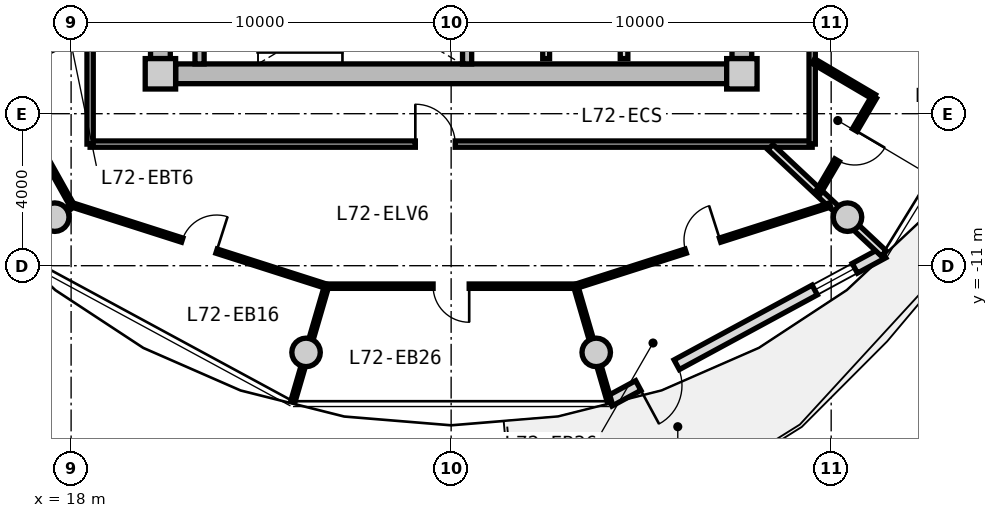
"""IFC4 building model, lengths in metres.
Left out: names, types, materials, properties, quantities, classifications, styles, units other than length and angle.
Written with IfcOpenShell. Run it as: python <this file> out.ifc"""

import sys

from ifc_helpers import new_model, si_unit, direction, frame, frame_2d, origin, origin_2d, place, context, subcontext, project, spatial, rectangle, circle, extrude, source, transform, mapped, element, fill, save


model = new_model("IFC4")
c1 = context("Model", 3, precision=1e-05, world=origin(), true_north=direction((0.0, 1.0)))
c2 = subcontext(c1, "Body", "Model", "MODEL_VIEW")
j1 = project(units=[si_unit("LENGTHUNIT", "METRE"), si_unit("PLANEANGLEUNIT", "RADIAN")], contexts=[c1])
p1 = place(None, origin())
s1 = spatial("IfcSite", under=j1, at=p1, CompositionType="ELEMENT")
p2 = place(p1, origin())
s2 = spatial("IfcBuilding", under=s1, at=p2, CompositionType="ELEMENT")
p3 = place(p2, frame((0.0, 0.0, 232.2)))
s3 = spatial("IfcBuildingStorey", under=s2, at=p3, CompositionType="ELEMENT", Elevation=232.2)
m1 = source(origin(), c2, "Body", "SweptSolid", [
    extrude(rectangle(XDim=0.8, YDim=0.8, at=origin_2d()), origin(), (0.0, 0.0, 1.0), 3.05),
])
for number, where, z_axis, x_axis in (
    (1, (20.35, -5.95, 0.0), (0.0, 0.0, 1.0), (1.0, 0.0, 0.0)),
    (2, (35.65, -5.95, 0.0), (0.0, 0.0, 1.0), (1.0, 0.0, 0.0)),
):
    element("IfcColumn", number, at=place(p3, frame(where, z_axis=z_axis, x_axis=x_axis)), inside=s3, PredefinedType="COLUMN", context=c2, shape_type="MappedRepresentation", body=[
        mapped(m1, transform((0.0, 0.0, 0.0), x_axis=(1.0, 0.0, 0.0), y_axis=(0.0, 1.0, 0.0), z_axis=(0.0, 0.0, 1.0), scale=1.0)),
    ])
m2 = source(origin(), c2, "Body", "SweptSolid", [
    extrude(rectangle(XDim=14.5, YDim=0.52, at=frame_2d((7.25, 0.0))), origin(), (0.0, 0.0, 1.0), 2.81),
])
p4 = place(p3, frame((35.25, -5.95, 0.0), z_axis=(0.0, 0.0, 1.0), x_axis=(-1.0, 0.0, 0.0)))
e3 = element("IfcWall", 3, at=p4, inside=s3, PredefinedType="SHEAR", context=c2, shape_type="MappedRepresentation", body=[
    mapped(m2, transform((0.0, 0.0, 0.0), x_axis=(1.0, 0.0, 0.0), y_axis=(0.0, 1.0, 0.0), z_axis=(0.0, 0.0, 1.0), scale=1.0)),
])
m3 = source(origin(), c2, "Body", "SweptSolid", [
    extrude(rectangle(XDim=11.1, YDim=0.52, at=frame_2d((5.55, 0.0))), origin(), (0.0, 0.0, 1.0), 2.81),
])
p5 = place(p3, frame((20.35, -5.55, 0.0), z_axis=(0.0, 0.0, 1.0), x_axis=(0.0, 1.0, 0.0)))
e4 = element("IfcWall", 4, at=p5, inside=s3, PredefinedType="SHEAR", context=c2, shape_type="MappedRepresentation", body=[
    mapped(m3, transform((0.0, 0.0, 0.0), x_axis=(1.0, 0.0, 0.0), y_axis=(0.0, 1.0, 0.0), z_axis=(0.0, 0.0, 1.0), scale=1.0)),
])
p6 = place(p5, frame((3.8, 0.0, 0.0)))
e5 = element("IfcOpeningElement", 5, at=p6, cuts=e4, PredefinedType="OPENING", context=c2, shape_type="SweptSolid", body=[
    extrude(rectangle(XDim=1.2, YDim=2.15, at=frame_2d((0.6, 1.075))), frame((0.0, 0.27, 0.0), z_axis=(0.0, -1.0, 0.0), x_axis=(1.0, 0.0, 0.0)), (0.0, 0.0, 1.0), 0.54),
])
p7 = place(p3, frame((35.65, 5.55, 0.0), z_axis=(0.0, 0.0, 1.0), x_axis=(0.0, -1.0, 0.0)))
e6 = element("IfcWall", 6, at=p7, inside=s3, PredefinedType="SHEAR", context=c2, shape_type="MappedRepresentation", body=[
    mapped(m3, transform((0.0, 0.0, 0.0), x_axis=(1.0, 0.0, 0.0), y_axis=(0.0, 1.0, 0.0), z_axis=(0.0, 0.0, 1.0), scale=1.0)),
])
p8 = place(p7, frame((5.65, 0.0, 0.0)))
e7 = element("IfcOpeningElement", 7, at=p8, cuts=e6, PredefinedType="OPENING", context=c2, shape_type="SweptSolid", body=[
    extrude(rectangle(XDim=1.2, YDim=2.15, at=frame_2d((0.6, 1.075))), frame((0.0, 0.27, 0.0), z_axis=(0.0, -1.0, 0.0), x_axis=(1.0, 0.0, 0.0)), (0.0, 0.0, 1.0), 0.54),
])
m4 = source(origin(), c2, "Body", "SweptSolid", [
    extrude(circle(Radius=0.375, at=origin_2d()), origin(), (0.0, 0.0, 1.0), 3.05),
])
for number, where, z_axis, x_axis in (
    (8, (17.57, -9.723, 0.0), (0.0, 0.0, 1.0), (1.0, 0.0, 0.0)),
    (9, (24.182, -13.281, 0.0), (0.0, 0.0, 1.0), (1.0, 0.0, 0.0)),
    (10, (31.818, -13.281, 0.0), (0.0, 0.0, 1.0), (1.0, 0.0, 0.0)),
    (11, (38.43, -9.723, 0.0), (0.0, 0.0, 1.0), (1.0, 0.0, 0.0)),
):
    element("IfcColumn", number, at=place(p3, frame(where, z_axis=z_axis, x_axis=x_axis)), inside=s3, PredefinedType="COLUMN", context=c2, shape_type="MappedRepresentation", body=[
        mapped(m4, transform((0.0, 0.0, 0.0), x_axis=(1.0, 0.0, 0.0), y_axis=(0.0, 1.0, 0.0), z_axis=(0.0, 0.0, 1.0), scale=1.0)),
    ])
m5 = source(origin(), c2, "Body", "SweptSolid", [
    extrude(rectangle(XDim=8.197, YDim=0.29, at=frame_2d((4.099, 0.0))), origin(), (0.0, 0.0, 1.0), 2.81),
])
p9 = place(p3, frame((39.37, -10.663, 0.0), z_axis=(0.0, 0.0, 1.0), x_axis=(-0.879369910001, -0.476139224791, 0.0)))
e12 = element("IfcWall", 12, at=p9, inside=s3, PredefinedType="SOLIDWALL", context=c2, shape_type="MappedRepresentation", body=[
    mapped(m5, transform((0.0, 0.0, 0.0), x_axis=(1.0, 0.0, 0.0), y_axis=(0.0, 1.0, 0.0), z_axis=(0.0, 0.0, 1.0), scale=1.0)),
])
p10 = place(p9, frame((6.18, 0.0, 0.0)))
e13 = element("IfcOpeningElement", 13, at=p10, cuts=e12, PredefinedType="OPENING", context=c2, shape_type="SweptSolid", body=[
    extrude(rectangle(XDim=1.15, YDim=2.25, at=frame_2d((0.575, 1.125))), frame((0.0, 0.155, 0.0), z_axis=(0.0, -1.0, 0.0), x_axis=(1.0, 0.0, 0.0)), (0.0, 0.0, 1.0), 0.31),
])
p11 = place(p9, frame((0.85, 0.0, 0.85)))
e14 = element("IfcOpeningElement", 14, at=p11, cuts=e12, PredefinedType="OPENING", context=c2, shape_type="SweptSolid", body=[
    extrude(rectangle(XDim=1.2, YDim=1.5, at=frame_2d((0.6, 0.75))), frame((0.0, 0.155, 0.0), z_axis=(0.0, -1.0, 0.0), x_axis=(1.0, 0.0, 0.0)), (0.0, 0.0, 1.0), 0.31),
])
m6 = source(origin(), c2, "Body", "SweptSolid", [
    extrude(rectangle(XDim=3.24, YDim=0.24, at=frame_2d((1.62, 0.0))), origin(), (0.0, 0.0, 1.0), 2.81),
])
for number, where, z_axis, x_axis in (
    (15, (21.38, -5.69, 0.0), (0.0, 0.0, 1.0), (0.0, 1.0, 0.0)),
    (16, (28.42, -5.69, 0.0), (0.0, 0.0, 1.0), (0.0, 1.0, 0.0)),
):
    element("IfcWall", number, at=place(p3, frame(where, z_axis=z_axis, x_axis=x_axis)), inside=s3, PredefinedType="PARTITIONING", context=c2, shape_type="MappedRepresentation", body=[
        mapped(m6, transform((0.0, 0.0, 0.0), x_axis=(1.0, 0.0, 0.0), y_axis=(0.0, 1.0, 0.0), z_axis=(0.0, 0.0, 1.0), scale=1.0)),
    ])
m7 = source(origin(), c2, "Body", "SweptSolid", [
    extrude(rectangle(XDim=3.8, YDim=0.2, at=frame_2d((1.9, 0.0))), origin(), (0.0, 0.0, 1.0), 2.795),
])
p12 = place(p3, frame((32.55, -5.55, 0.0), z_axis=(0.0, 0.0, 1.0), x_axis=(0.0, 1.0, 0.0)))
e17 = element("IfcWall", 17, at=p12, inside=s3, PredefinedType="PARTITIONING", context=c2, shape_type="MappedRepresentation", body=[
    mapped(m7, transform((0.0, 0.0, 0.0), x_axis=(1.0, 0.0, 0.0), y_axis=(0.0, 1.0, 0.0), z_axis=(0.0, 0.0, 1.0), scale=1.0)),
])
m8 = source(origin(), c2, "Body", "SweptSolid", [
    extrude(rectangle(XDim=4.2, YDim=0.18, at=frame_2d((2.1, 0.0))), origin(), (0.0, 0.0, 1.0), 2.795),
])
p13 = place(p3, frame((30.5, -5.55, 0.0), z_axis=(0.0, 0.0, 1.0), x_axis=(0.0, 1.0, 0.0)))
e18 = element("IfcWall", 18, at=p13, inside=s3, PredefinedType="PARTITIONING", context=c2, shape_type="MappedRepresentation", body=[
    mapped(m8, transform((0.0, 0.0, 0.0), x_axis=(1.0, 0.0, 0.0), y_axis=(0.0, 1.0, 0.0), z_axis=(0.0, 0.0, 1.0), scale=1.0)),
])
m9 = source(origin(), c2, "Body", "SweptSolid", [
    extrude(rectangle(XDim=19.0, YDim=0.165, at=frame_2d((9.5, 0.0))), origin(), (0.0, 0.0, 1.0), 2.795),
])
p14 = place(p3, frame((37.5, -7.8, 0.0), z_axis=(0.0, 0.0, 1.0), x_axis=(-1.0, 0.0, 0.0)))
e19 = element("IfcWall", 19, at=p14, inside=s3, PredefinedType="PARTITIONING", context=c2, shape_type="MappedRepresentation", body=[
    mapped(m9, transform((0.0, 0.0, 0.0), x_axis=(1.0, 0.0, 0.0), y_axis=(0.0, 1.0, 0.0), z_axis=(0.0, 0.0, 1.0), scale=1.0)),
])
p15 = place(p14, frame((9.392, 0.0, 0.0)))
e20 = element("IfcOpeningElement", 20, at=p15, cuts=e19, PredefinedType="OPENING", context=c2, shape_type="SweptSolid", body=[
    extrude(rectangle(XDim=1.05, YDim=2.15, at=frame_2d((0.525, 1.075))), frame((0.0, 0.093, 0.0), z_axis=(0.0, -1.0, 0.0), x_axis=(1.0, 0.0, 0.0)), (0.0, 0.0, 1.0), 0.185),
])
m10 = source(origin(), c2, "Body", "SweptSolid", [
    extrude(rectangle(XDim=6.88, YDim=0.165, at=frame_2d((3.44, 0.0))), origin(), (0.0, 0.0, 1.0), 2.795),
])
p16 = place(p3, frame((18.5, -7.8, 0.0), z_axis=(0.0, 0.0, 1.0), x_axis=(0.0, 1.0, 0.0)))
e21 = element("IfcWall", 21, at=p16, inside=s3, PredefinedType="PARTITIONING", context=c2, shape_type="MappedRepresentation", body=[
    mapped(m10, transform((0.0, 0.0, 0.0), x_axis=(1.0, 0.0, 0.0), y_axis=(0.0, 1.0, 0.0), z_axis=(0.0, 0.0, 1.0), scale=1.0)),
])
p17 = place(p3, frame((37.5, -0.92, 0.0), z_axis=(0.0, 0.0, 1.0), x_axis=(0.0, -1.0, 0.0)))
e22 = element("IfcWall", 22, at=p17, inside=s3, PredefinedType="PARTITIONING", context=c2, shape_type="MappedRepresentation", body=[
    mapped(m10, transform((0.0, 0.0, 0.0), x_axis=(1.0, 0.0, 0.0), y_axis=(0.0, 1.0, 0.0), z_axis=(0.0, 0.0, 1.0), scale=1.0)),
])
p18 = place(p17, frame((2.586, 0.0, 0.0)))
e23 = element("IfcOpeningElement", 23, at=p18, cuts=e22, PredefinedType="OPENING", context=c2, shape_type="SweptSolid", body=[
    extrude(rectangle(XDim=1.05, YDim=2.15, at=frame_2d((0.525, 1.075))), frame((0.0, 0.093, 0.0), z_axis=(0.0, -1.0, 0.0), x_axis=(1.0, 0.0, 0.0)), (0.0, 0.0, 1.0), 0.185),
])
m11 = source(origin(), c2, "Body", "SweptSolid", [
    extrude(rectangle(XDim=4.089, YDim=0.19, at=frame_2d((2.044, 0.0))), origin(), (0.0, 0.0, 1.0), 2.395),
])
p19 = place(p3, frame((36.402, -7.88, 0.0), z_axis=(0.0, 0.0, 1.0), x_axis=(0.729401273609, -0.684086092577, 0.0)))
e24 = element("IfcWall", 24, at=p19, inside=s3, PredefinedType="PARTITIONING", context=c2, shape_type="MappedRepresentation", body=[
    mapped(m11, transform((0.0, 0.0, 0.0), x_axis=(1.0, 0.0, 0.0), y_axis=(0.0, 1.0, 0.0), z_axis=(0.0, 0.0, 1.0), scale=1.0)),
])
m12 = source(origin(), c2, "Body", "SweptSolid", [
    extrude(rectangle(XDim=7.024, YDim=0.115, at=frame_2d((3.512, 0.0))), origin(), (0.0, 0.0, 1.0), 2.795),
])
p20 = place(p3, frame((18.03, -9.401, 0.0), z_axis=(0.0, 0.0, 1.0), x_axis=(0.952454006655, -0.304682400552, 0.0)))
e25 = element("IfcWall", 25, at=p20, inside=s3, PredefinedType="PARTITIONING", context=c2, shape_type="MappedRepresentation", body=[
    mapped(m12, transform((0.0, 0.0, 0.0), x_axis=(1.0, 0.0, 0.0), y_axis=(0.0, 1.0, 0.0), z_axis=(0.0, 0.0, 1.0), scale=1.0)),
])
p21 = place(p20, frame((3.037, 0.0, 0.0)))
e26 = element("IfcOpeningElement", 26, at=p21, cuts=e25, PredefinedType="OPENING", context=c2, shape_type="SweptSolid", body=[
    extrude(rectangle(XDim=0.95, YDim=2.1, at=frame_2d((0.475, 1.05))), frame((0.0, 0.067, 0.0), z_axis=(0.0, -1.0, 0.0), x_axis=(1.0, 0.0, 0.0)), (0.0, 0.0, 1.0), 0.135),
])
m13 = source(origin(), c2, "Body", "SweptSolid", [
    extrude(rectangle(XDim=1.905, YDim=0.115, at=frame_2d((0.953, 0.0))), origin(), (0.0, 0.0, 1.0), 2.395),
])
p22 = place(p3, frame((18.03, -9.401, 0.0), z_axis=(0.0, 0.0, 1.0), x_axis=(-0.742624708137, -0.669707804094, 0.0)))
e27 = element("IfcWall", 27, at=p22, inside=s3, PredefinedType="PARTITIONING", context=c2, shape_type="MappedRepresentation", body=[
    mapped(m13, transform((0.0, 0.0, 0.0), x_axis=(1.0, 0.0, 0.0), y_axis=(0.0, 1.0, 0.0), z_axis=(0.0, 0.0, 1.0), scale=1.0)),
])
m14 = source(origin(), c2, "Body", "SweptSolid", [
    extrude(rectangle(XDim=6.558, YDim=0.115, at=frame_2d((3.279, 0.0))), origin(), (0.0, 0.0, 1.0), 2.795),
])
p23 = place(p3, frame((24.721, -11.539, 0.0), z_axis=(0.0, 0.0, 1.0), x_axis=(1.0, 0.0, 0.0)))
e28 = element("IfcWall", 28, at=p23, inside=s3, PredefinedType="PARTITIONING", context=c2, shape_type="MappedRepresentation", body=[
    mapped(m14, transform((0.0, 0.0, 0.0), x_axis=(1.0, 0.0, 0.0), y_axis=(0.0, 1.0, 0.0), z_axis=(0.0, 0.0, 1.0), scale=1.0)),
])
p24 = place(p23, frame((2.804, 0.0, 0.0)))
e29 = element("IfcOpeningElement", 29, at=p24, cuts=e28, PredefinedType="OPENING", context=c2, shape_type="SweptSolid", body=[
    extrude(rectangle(XDim=0.95, YDim=2.1, at=frame_2d((0.475, 1.05))), frame((0.0, 0.067, 0.0), z_axis=(0.0, -1.0, 0.0), x_axis=(1.0, 0.0, 0.0)), (0.0, 0.0, 1.0), 0.135),
])
m15 = source(origin(), c2, "Body", "SweptSolid", [
    extrude(rectangle(XDim=3.173, YDim=0.115, at=frame_2d((1.587, 0.0))), origin(), (0.0, 0.0, 1.0), 2.395),
])
p25 = place(p3, frame((24.721, -11.539, 0.0), z_axis=(0.0, 0.0, 1.0), x_axis=(-0.279878875918, -0.960035319566, 0.0)))
e30 = element("IfcWall", 30, at=p25, inside=s3, PredefinedType="PARTITIONING", context=c2, shape_type="MappedRepresentation", body=[
    mapped(m15, transform((0.0, 0.0, 0.0), x_axis=(1.0, 0.0, 0.0), y_axis=(0.0, 1.0, 0.0), z_axis=(0.0, 0.0, 1.0), scale=1.0)),
])
p26 = place(p3, frame((31.28, -11.542, 0.0), z_axis=(0.0, 0.0, 1.0), x_axis=(0.952454006655, 0.304682400552, 0.0)))
e31 = element("IfcWall", 31, at=p26, inside=s3, PredefinedType="PARTITIONING", context=c2, shape_type="MappedRepresentation", body=[
    mapped(m12, transform((0.0, 0.0, 0.0), x_axis=(1.0, 0.0, 0.0), y_axis=(0.0, 1.0, 0.0), z_axis=(0.0, 0.0, 1.0), scale=1.0)),
])
p27 = place(p26, frame((3.037, 0.0, 0.0)))
e32 = element("IfcOpeningElement", 32, at=p27, cuts=e31, PredefinedType="OPENING", context=c2, shape_type="SweptSolid", body=[
    extrude(rectangle(XDim=0.95, YDim=2.1, at=frame_2d((0.475, 1.05))), frame((0.0, 0.067, 0.0), z_axis=(0.0, -1.0, 0.0), x_axis=(1.0, 0.0, 0.0)), (0.0, 0.0, 1.0), 0.135),
])
m16 = source(origin(), c2, "Body", "SweptSolid", [
    extrude(rectangle(XDim=3.171, YDim=0.115, at=frame_2d((1.585, 0.0))), origin(), (0.0, 0.0, 1.0), 2.395),
])
p28 = place(p3, frame((31.28, -11.542, 0.0), z_axis=(0.0, 0.0, 1.0), x_axis=(0.279893554029, -0.960031040338, 0.0)))
e33 = element("IfcWall", 33, at=p28, inside=s3, PredefinedType="PARTITIONING", context=c2, shape_type="MappedRepresentation", body=[
    mapped(m16, transform((0.0, 0.0, 0.0), x_axis=(1.0, 0.0, 0.0), y_axis=(0.0, 1.0, 0.0), z_axis=(0.0, 0.0, 1.0), scale=1.0)),
])
m17 = source(origin(), c2, "Body", "SweptSolid", [
    extrude(rectangle(XDim=1.638, YDim=0.14, at=frame_2d((0.819, 0.0))), origin(), (0.0, 0.0, 1.0), 2.795),
])
p29 = place(p3, frame((18.47, -4.778, 0.0), z_axis=(0.0, 0.0, 1.0), x_axis=(-0.893919977945, -0.448226586707, 0.0)))
e34 = element("IfcWall", 34, at=p29, inside=s3, PredefinedType="PARTITIONING", context=c2, shape_type="MappedRepresentation", body=[
    mapped(m17, transform((0.0, 0.0, 0.0), x_axis=(1.0, 0.0, 0.0), y_axis=(0.0, 1.0, 0.0), z_axis=(0.0, 0.0, 1.0), scale=1.0)),
])
m18 = source(origin(), c2, "Body", "SweptSolid", [
    extrude(rectangle(XDim=3.493, YDim=0.115, at=frame_2d((1.746, 0.0))), origin(), (0.0, 0.0, 1.0), 2.795),
])
p30 = place(p3, frame((16.318, -6.36, 0.0), z_axis=(0.0, 0.0, 1.0), x_axis=(0.487896553961, -0.872901456427, 0.0)))
e35 = element("IfcWall", 35, at=p30, inside=s3, PredefinedType="PARTITIONING", context=c2, shape_type="MappedRepresentation", body=[
    mapped(m18, transform((0.0, 0.0, 0.0), x_axis=(1.0, 0.0, 0.0), y_axis=(0.0, 1.0, 0.0), z_axis=(0.0, 0.0, 1.0), scale=1.0)),
])
p31 = place(p30, frame((1.271, 0.0, 0.0)))
e36 = element("IfcOpeningElement", 36, at=p31, cuts=e35, PredefinedType="OPENING", context=c2, shape_type="SweptSolid", body=[
    extrude(rectangle(XDim=0.95, YDim=2.1, at=frame_2d((0.475, 1.05))), frame((0.0, 0.067, 0.0), z_axis=(0.0, -1.0, 0.0), x_axis=(1.0, 0.0, 0.0)), (0.0, 0.0, 1.0), 0.135),
])
m19 = source(origin(), c2, "Body", "SweptSolid", [
    extrude(rectangle(XDim=1.859, YDim=0.14, at=frame_2d((0.93, 0.0))), origin(), (0.0, 0.0, 1.0), 2.795),
])
p32 = place(p3, frame((37.53, -5.615, 0.0), z_axis=(0.0, 0.0, 1.0), x_axis=(0.861555897139, -0.507662718845, 0.0)))
e37 = element("IfcWall", 37, at=p32, inside=s3, PredefinedType="PARTITIONING", context=c2, shape_type="MappedRepresentation", body=[
    mapped(m19, transform((0.0, 0.0, 0.0), x_axis=(1.0, 0.0, 0.0), y_axis=(0.0, 1.0, 0.0), z_axis=(0.0, 0.0, 1.0), scale=1.0)),
])
m20 = source(origin(), c2, "Body", "SweptSolid", [
    extrude(rectangle(XDim=2.939, YDim=0.14, at=frame_2d((1.47, 0.0))), origin(), (0.0, 0.0, 1.0), 2.795),
])
p33 = place(p3, frame((39.132, -6.559, 0.0), z_axis=(0.0, 0.0, 1.0), x_axis=(-0.505883614636, -0.862601743821, 0.0)))
e38 = element("IfcWall", 38, at=p33, inside=s3, PredefinedType="PARTITIONING", context=c2, shape_type="MappedRepresentation", body=[
    mapped(m20, transform((0.0, 0.0, 0.0), x_axis=(1.0, 0.0, 0.0), y_axis=(0.0, 1.0, 0.0), z_axis=(0.0, 0.0, 1.0), scale=1.0)),
])
p34 = place(p33, frame((1.01, 0.0, 0.0)))
e39 = element("IfcOpeningElement", 39, at=p34, cuts=e38, PredefinedType="OPENING", context=c2, shape_type="SweptSolid", body=[
    extrude(rectangle(XDim=0.92, YDim=2.1, at=frame_2d((0.46, 1.05))), frame((0.0, 0.08, 0.0), z_axis=(0.0, -1.0, 0.0), x_axis=(1.0, 0.0, 0.0)), (0.0, 0.0, 1.0), 0.16),
])
m21 = source(origin(), c2, "Body", "SweptSolid", [
    extrude(rectangle(XDim=1.15, YDim=2.25, at=frame_2d((0.575, 1.125))), frame((0.0, 0.025, 0.0), z_axis=(0.0, -1.0, 0.0), x_axis=(1.0, 0.0, 0.0)), (0.0, 0.0, 1.0), 0.05),
])
p35 = place(p10, origin())
e40 = element("IfcDoor", 40, at=p35, inside=s3, OperationType="SINGLE_SWING_RIGHT", PredefinedType="DOOR", context=c2, shape_type="MappedRepresentation", body=[
    mapped(m21, transform((0.0, 0.0, 0.0), x_axis=(1.0, 0.0, 0.0), y_axis=(0.0, 1.0, 0.0), z_axis=(0.0, 0.0, 1.0), scale=1.0)),
])
fill(e13, e40)
m22 = source(origin(), c2, "Body", "SweptSolid", [
    extrude(rectangle(XDim=1.2, YDim=1.5, at=frame_2d((0.6, 0.75))), frame((0.0, 0.03, 0.0), z_axis=(0.0, -1.0, 0.0), x_axis=(1.0, 0.0, 0.0)), (0.0, 0.0, 1.0), 0.06),
])
p36 = place(p11, origin())
e41 = element("IfcWindow", 41, at=p36, inside=s3, PartitioningType="SINGLE_PANEL", PredefinedType="WINDOW", context=c2, shape_type="MappedRepresentation", body=[
    mapped(m22, transform((0.0, 0.0, 0.0), x_axis=(1.0, 0.0, 0.0), y_axis=(0.0, 1.0, 0.0), z_axis=(0.0, 0.0, 1.0), scale=1.0)),
])
fill(e14, e41)
m23 = source(origin(), c2, "Body", "SweptSolid", [
    extrude(rectangle(XDim=1.05, YDim=2.15, at=frame_2d((0.525, 1.075))), frame((0.0, 0.025, 0.0), z_axis=(0.0, -1.0, 0.0), x_axis=(1.0, 0.0, 0.0)), (0.0, 0.0, 1.0), 0.05),
])
p37 = place(p15, frame((1.05, 0.0, 0.0), z_axis=(0.0, 0.0, 1.0), x_axis=(-1.0, 0.0, 0.0)))
e42 = element("IfcDoor", 42, at=p37, inside=s3, OperationType="SINGLE_SWING_LEFT", PredefinedType="DOOR", context=c2, shape_type="MappedRepresentation", body=[
    mapped(m23, transform((0.0, 0.0, 0.0), x_axis=(1.0, 0.0, 0.0), y_axis=(0.0, 1.0, 0.0), z_axis=(0.0, 0.0, 1.0), scale=1.0)),
])
fill(e20, e42)
m24 = source(origin(), c2, "Body", "SweptSolid", [
    extrude(rectangle(XDim=0.95, YDim=2.1, at=frame_2d((0.475, 1.05))), frame((0.0, 0.025, 0.0), z_axis=(0.0, -1.0, 0.0), x_axis=(1.0, 0.0, 0.0)), (0.0, 0.0, 1.0), 0.05),
])
p38 = place(p21, origin())
e43 = element("IfcDoor", 43, at=p38, inside=s3, OperationType="SINGLE_SWING_RIGHT", PredefinedType="DOOR", context=c2, shape_type="MappedRepresentation", body=[
    mapped(m24, transform((0.0, 0.0, 0.0), x_axis=(1.0, 0.0, 0.0), y_axis=(0.0, 1.0, 0.0), z_axis=(0.0, 0.0, 1.0), scale=1.0)),
])
fill(e26, e43)
p39 = place(p24, frame((0.95, 0.0, 0.0), z_axis=(0.0, 0.0, 1.0), x_axis=(-1.0, 0.0, 0.0)))
e44 = element("IfcDoor", 44, at=p39, inside=s3, OperationType="SINGLE_SWING_LEFT", PredefinedType="DOOR", context=c2, shape_type="MappedRepresentation", body=[
    mapped(m24, transform((0.0, 0.0, 0.0), x_axis=(1.0, 0.0, 0.0), y_axis=(0.0, 1.0, 0.0), z_axis=(0.0, 0.0, 1.0), scale=1.0)),
])
fill(e29, e44)
p40 = place(p27, origin())
e45 = element("IfcDoor", 45, at=p40, inside=s3, OperationType="SINGLE_SWING_RIGHT", PredefinedType="DOOR", context=c2, shape_type="MappedRepresentation", body=[
    mapped(m24, transform((0.0, 0.0, 0.0), x_axis=(1.0, 0.0, 0.0), y_axis=(0.0, 1.0, 0.0), z_axis=(0.0, 0.0, 1.0), scale=1.0)),
])
fill(e32, e45)
m25 = source(origin(), c2, "Body", "SweptSolid", [
    extrude(rectangle(XDim=0.92, YDim=2.1, at=frame_2d((0.46, 1.05))), frame((0.0, 0.025, 0.0), z_axis=(0.0, -1.0, 0.0), x_axis=(1.0, 0.0, 0.0)), (0.0, 0.0, 1.0), 0.05),
])
p41 = place(p34, origin())
e46 = element("IfcDoor", 46, at=p41, inside=s3, OperationType="SINGLE_SWING_LEFT", PredefinedType="DOOR", context=c2, shape_type="MappedRepresentation", body=[
    mapped(m25, transform((0.0, 0.0, 0.0), x_axis=(1.0, 0.0, 0.0), y_axis=(0.0, 1.0, 0.0), z_axis=(0.0, 0.0, 1.0), scale=1.0)),
])
fill(e39, e46)
save(model, sys.argv[1])
